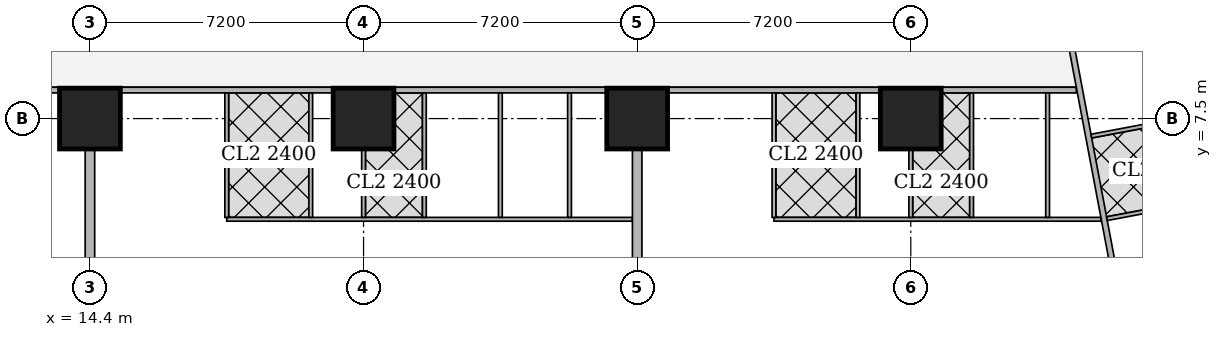
"""IFC4 building model, lengths in metres.
Left out: names, types, materials, properties, quantities, classifications, styles, units other than length and angle.
Written with IfcOpenShell. Run it as: python <this file> out.ifc"""

import sys

from ifc_helpers import new_model, si_unit, direction, frame, frame_2d, origin, origin_2d, place, context, subcontext, project, spatial, rectangle, extrude, element, fill, save


model = new_model("IFC4")
c1 = context("Model", 3, precision=1e-05, world=origin(), true_north=direction((0.0, 1.0)))
c2 = subcontext(c1, "Body", "Model", "MODEL_VIEW")
j1 = project(units=[si_unit("LENGTHUNIT", "METRE"), si_unit("PLANEANGLEUNIT", "RADIAN")], contexts=[c1])
p1 = place(None, origin())
s1 = spatial("IfcSite", under=j1, at=p1, CompositionType="ELEMENT")
p2 = place(p1, origin())
s2 = spatial("IfcBuilding", under=s1, at=p2, CompositionType="ELEMENT")
p3 = place(p2, frame((0.0, 0.0, 81.65)))
s3 = spatial("IfcBuildingStorey", under=s2, at=p3, CompositionType="ELEMENT", Elevation=81.65)
for number, where, z_axis, x_axis in (
    (1, (14.4, 7.5, 0.0), (0.0, 0.0, 1.0), (1.0, 0.0, 0.0)),
    (2, (21.6, 7.5, 0.0), (0.0, 0.0, 1.0), (1.0, 0.0, 0.0)),
    (3, (28.8, 7.5, 0.0), (0.0, 0.0, 1.0), (1.0, 0.0, 0.0)),
    (4, (36.0, 7.5, 0.0), (0.0, 0.0, 1.0), (1.0, 0.0, 0.0)),
):
    element("IfcColumn", number, at=place(p3, frame(where, z_axis=z_axis, x_axis=x_axis)), inside=s3, PredefinedType="COLUMN", context=c2, shape_type="SweptSolid", body=[
        extrude(rectangle(XDim=1.6, YDim=1.6, at=origin_2d()), origin(), (0.0, 0.0, 1.0), 3.75),
    ])
p4 = place(p3, frame((40.356, 8.25, 0.0), z_axis=(0.0, 0.0, 1.0), x_axis=(-1.0, 0.0, 0.0)))
e5 = element("IfcWall", 5, at=p4, inside=s3, PredefinedType="SOLIDWALL", context=c2, shape_type="SweptSolid", body=[
    extrude(rectangle(XDim=3.555, YDim=0.15, at=frame_2d((1.777, 0.0))), origin(), (0.0, 0.0, 1.0), 3.5),
])
p5 = place(p3, frame((35.199, 8.25, 0.0), z_axis=(0.0, 0.0, 1.0), x_axis=(-1.0, 0.0, 0.0)))
e6 = element("IfcWall", 6, at=p5, inside=s3, PredefinedType="SOLIDWALL", context=c2, shape_type="SweptSolid", body=[
    extrude(rectangle(XDim=5.598, YDim=0.15, at=frame_2d((2.799, 0.0))), origin(), (0.0, 0.0, 1.0), 3.5),
])
p6 = place(p5, frame((3.899, 0.0, 0.0)))
e7 = element("IfcOpeningElement", 7, at=p6, cuts=e6, PredefinedType="OPENING", context=c2, shape_type="SweptSolid", body=[
    extrude(rectangle(XDim=1.0, YDim=2.1, at=frame_2d((0.5, 1.05))), frame((0.0, 0.085, 0.0), z_axis=(0.0, -1.0, 0.0), x_axis=(1.0, 0.0, 0.0)), (0.0, 0.0, 1.0), 0.17),
])
p7 = place(p3, frame((27.999, 8.25, 0.0), z_axis=(0.0, 0.0, 1.0), x_axis=(-1.0, 0.0, 0.0)))
e8 = element("IfcWall", 8, at=p7, inside=s3, PredefinedType="SOLIDWALL", context=c2, shape_type="SweptSolid", body=[
    extrude(rectangle(XDim=5.598, YDim=0.15, at=frame_2d((2.799, 0.0))), origin(), (0.0, 0.0, 1.0), 3.5),
])
p8 = place(p3, frame((20.799, 8.25, 0.0), z_axis=(0.0, 0.0, 1.0), x_axis=(-1.0, 0.0, 0.0)))
e9 = element("IfcWall", 9, at=p8, inside=s3, PredefinedType="SOLIDWALL", context=c2, shape_type="SweptSolid", body=[
    extrude(rectangle(XDim=5.598, YDim=0.15, at=frame_2d((2.799, 0.0))), origin(), (0.0, 0.0, 1.0), 3.5),
])
p9 = place(p8, frame((3.899, 0.0, 0.0)))
e10 = element("IfcOpeningElement", 10, at=p9, cuts=e9, PredefinedType="OPENING", context=c2, shape_type="SweptSolid", body=[
    extrude(rectangle(XDim=1.0, YDim=2.1, at=frame_2d((0.5, 1.05))), frame((0.0, 0.085, 0.0), z_axis=(0.0, -1.0, 0.0), x_axis=(1.0, 0.0, 0.0)), (0.0, 0.0, 1.0), 0.17),
])
p10 = place(p3, frame((13.599, 8.25, 0.0), z_axis=(0.0, 0.0, 1.0), x_axis=(-1.0, 0.0, 0.0)))
e11 = element("IfcWall", 11, at=p10, inside=s3, PredefinedType="SOLIDWALL", context=c2, shape_type="SweptSolid", body=[
    extrude(rectangle(XDim=5.499, YDim=0.15, at=frame_2d((2.75, 0.0))), origin(), (0.0, 0.0, 1.0), 3.5),
])
p11 = place(p10, frame((0.76, 0.0, 0.0)))
e12 = element("IfcOpeningElement", 12, at=p11, cuts=e11, PredefinedType="OPENING", context=c2, shape_type="SweptSolid", body=[
    extrude(rectangle(XDim=1.0, YDim=2.1, at=frame_2d((0.5, 1.05))), frame((0.0, 0.085, 0.0), z_axis=(0.0, -1.0, 0.0), x_axis=(1.0, 0.0, 0.0)), (0.0, 0.0, 1.0), 0.17),
])
p12 = place(p3, frame((33.382, 45.65, 0.0), z_axis=(0.0, 0.0, 1.0), x_axis=(0.185593544777, -0.982626600565, 0.0)))
e13 = element("IfcWall", 13, at=p12, inside=s3, PredefinedType="SOLIDWALL", context=c2, shape_type="SweptSolid", body=[
    extrude(rectangle(XDim=47.118, YDim=0.15, at=frame_2d((23.559, 0.0))), origin(), (0.0, 0.0, 1.0), 2.2),
])
p13 = place(p12, frame((19.054, 0.0, 0.0)))
e14 = element("IfcOpeningElement", 14, at=p13, cuts=e13, PredefinedType="OPENING", context=c2, shape_type="SweptSolid", body=[
    extrude(rectangle(XDim=1.0, YDim=2.1, at=frame_2d((0.5, 1.05))), frame((0.0, 0.085, 0.0), z_axis=(0.0, -1.0, 0.0), x_axis=(1.0, 0.0, 0.0)), (0.0, 0.0, 1.0), 0.17),
])
p14 = place(p12, frame((22.87, 0.0, 0.0)))
e15 = element("IfcOpeningElement", 15, at=p14, cuts=e13, PredefinedType="OPENING", context=c2, shape_type="SweptSolid", body=[
    extrude(rectangle(XDim=1.0, YDim=2.1, at=frame_2d((0.5, 1.05))), frame((0.0, 0.085, 0.0), z_axis=(0.0, -1.0, 0.0), x_axis=(1.0, 0.0, 0.0)), (0.0, 0.0, 1.0), 0.17),
])
p15 = place(p12, frame((33.833, 0.0, 0.0)))
e16 = element("IfcOpeningElement", 16, at=p15, cuts=e13, PredefinedType="OPENING", context=c2, shape_type="SweptSolid", body=[
    extrude(rectangle(XDim=1.0, YDim=2.1, at=frame_2d((0.5, 1.05))), frame((0.0, 0.085, 0.0), z_axis=(0.0, -1.0, 0.0), x_axis=(1.0, 0.0, 0.0)), (0.0, 0.0, 1.0), 0.17),
])
p16 = place(p3, frame((28.675, 4.85, 0.0), z_axis=(0.0, 0.0, 1.0), x_axis=(-1.0, 0.0, 0.0)))
e17 = element("IfcWall", 17, at=p16, inside=s3, PredefinedType="PARTITIONING", context=c2, shape_type="SweptSolid", body=[
    extrude(rectangle(XDim=10.675, YDim=0.1, at=frame_2d((5.337, 0.0))), origin(), (0.0, 0.0, 1.0), 3.5),
])
p17 = place(p16, frame((9.12, 0.0, 0.0)))
e18 = element("IfcOpeningElement", 18, at=p17, cuts=e17, PredefinedType="OPENING", context=c2, shape_type="SweptSolid", body=[
    extrude(rectangle(XDim=0.9, YDim=2.1, at=frame_2d((0.45, 1.05))), frame((0.0, 0.06, 0.0), z_axis=(0.0, -1.0, 0.0), x_axis=(1.0, 0.0, 0.0)), (0.0, 0.0, 1.0), 0.12),
])
p18 = place(p16, frame((5.825, 0.0, 0.0)))
e19 = element("IfcOpeningElement", 19, at=p18, cuts=e17, PredefinedType="OPENING", context=c2, shape_type="SweptSolid", body=[
    extrude(rectangle(XDim=0.9, YDim=2.1, at=frame_2d((0.45, 1.05))), frame((0.0, 0.06, 0.0), z_axis=(0.0, -1.0, 0.0), x_axis=(1.0, 0.0, 0.0)), (0.0, 0.0, 1.0), 0.12),
])
p19 = place(p16, frame((2.115, 0.0, 0.0)))
e20 = element("IfcOpeningElement", 20, at=p19, cuts=e17, PredefinedType="OPENING", context=c2, shape_type="SweptSolid", body=[
    extrude(rectangle(XDim=0.9, YDim=2.1, at=frame_2d((0.45, 1.05))), frame((0.0, 0.06, 0.0), z_axis=(0.0, -1.0, 0.0), x_axis=(1.0, 0.0, 0.0)), (0.0, 0.0, 1.0), 0.12),
])
p20 = place(p16, frame((7.32, 0.0, 0.0)))
e21 = element("IfcOpeningElement", 21, at=p20, cuts=e17, PredefinedType="OPENING", context=c2, shape_type="SweptSolid", body=[
    extrude(rectangle(XDim=0.9, YDim=2.1, at=frame_2d((0.45, 1.05))), frame((0.0, 0.06, 0.0), z_axis=(0.0, -1.0, 0.0), x_axis=(1.0, 0.0, 0.0)), (0.0, 0.0, 1.0), 0.12),
])
p21 = place(p16, frame((4.025, 0.0, 0.0)))
e22 = element("IfcOpeningElement", 22, at=p21, cuts=e17, PredefinedType="OPENING", context=c2, shape_type="SweptSolid", body=[
    extrude(rectangle(XDim=0.9, YDim=2.1, at=frame_2d((0.45, 1.05))), frame((0.0, 0.06, 0.0), z_axis=(0.0, -1.0, 0.0), x_axis=(1.0, 0.0, 0.0)), (0.0, 0.0, 1.0), 0.12),
])
p22 = place(p16, frame((0.315, 0.0, 0.0)))
e23 = element("IfcOpeningElement", 23, at=p22, cuts=e17, PredefinedType="OPENING", context=c2, shape_type="SweptSolid", body=[
    extrude(rectangle(XDim=0.9, YDim=2.1, at=frame_2d((0.45, 1.05))), frame((0.0, 0.06, 0.0), z_axis=(0.0, -1.0, 0.0), x_axis=(1.0, 0.0, 0.0)), (0.0, 0.0, 1.0), 0.12),
])
p23 = place(p3, frame((18.0, 4.9, 0.0), z_axis=(0.0, 0.0, 1.0), x_axis=(0.0, 1.0, 0.0)))
e24 = element("IfcWall", 24, at=p23, inside=s3, PredefinedType="PARTITIONING", context=c2, shape_type="SweptSolid", body=[
    extrude(rectangle(XDim=3.275, YDim=0.1, at=frame_2d((1.638, 0.0))), origin(), (0.0, 0.0, 1.0), 3.5),
])
p24 = place(p3, frame((21.6, 4.9, 0.0), z_axis=(0.0, 0.0, 1.0), x_axis=(0.0, 1.0, 0.0)))
e25 = element("IfcWall", 25, at=p24, inside=s3, PredefinedType="PARTITIONING", context=c2, shape_type="SweptSolid", body=[
    extrude(rectangle(XDim=1.799, YDim=0.1, at=frame_2d((0.899, 0.0))), origin(), (0.0, 0.0, 1.0), 3.5),
])
for number, where, z_axis, x_axis in (
    (26, (25.2, 4.9, 0.0), (0.0, 0.0, 1.0), (0.0, 1.0, 0.0)),
    (27, (20.21, 4.9, 0.0), (0.0, 0.0, 1.0), (0.0, 1.0, 0.0)),
    (28, (23.2, 4.9, 0.0), (0.0, 0.0, 1.0), (0.0, 1.0, 0.0)),
    (29, (27.02, 4.9, 0.0), (0.0, 0.0, 1.0), (0.0, 1.0, 0.0)),
):
    element("IfcWall", number, at=place(p3, frame(where, z_axis=z_axis, x_axis=x_axis)), inside=s3, PredefinedType="PARTITIONING", context=c2, shape_type="SweptSolid", body=[
        extrude(rectangle(XDim=3.275, YDim=0.1, at=frame_2d((1.638, 0.0))), origin(), (0.0, 0.0, 1.0), 3.5),
    ])
p25 = place(p3, frame((14.4, 3.65, 0.0), z_axis=(0.0, 0.0, 1.0), x_axis=(0.0, 1.0, 0.0)))
e30 = element("IfcWall", 30, at=p25, inside=s3, PredefinedType="SOLIDWALL", context=c2, shape_type="SweptSolid", body=[
    extrude(rectangle(XDim=3.049, YDim=0.25, at=frame_2d((1.524, 0.0))), origin(), (0.0, 0.0, 1.0), 3.5),
])
p26 = place(p3, frame((41.002, 4.85, 0.0), z_axis=(0.0, 0.0, 1.0), x_axis=(-1.0, 0.0, 0.0)))
e31 = element("IfcWall", 31, at=p26, inside=s3, PredefinedType="PARTITIONING", context=c2, shape_type="SweptSolid", body=[
    extrude(rectangle(XDim=8.602, YDim=0.1, at=frame_2d((4.301, 0.0))), origin(), (0.0, 0.0, 1.0), 3.5),
])
p27 = place(p26, frame((7.047, 0.0, 0.0)))
e32 = element("IfcOpeningElement", 32, at=p27, cuts=e31, PredefinedType="OPENING", context=c2, shape_type="SweptSolid", body=[
    extrude(rectangle(XDim=0.9, YDim=2.1, at=frame_2d((0.45, 1.05))), frame((0.0, 0.06, 0.0), z_axis=(0.0, -1.0, 0.0), x_axis=(1.0, 0.0, 0.0)), (0.0, 0.0, 1.0), 0.12),
])
p28 = place(p26, frame((3.752, 0.0, 0.0)))
e33 = element("IfcOpeningElement", 33, at=p28, cuts=e31, PredefinedType="OPENING", context=c2, shape_type="SweptSolid", body=[
    extrude(rectangle(XDim=0.9, YDim=2.1, at=frame_2d((0.45, 1.05))), frame((0.0, 0.06, 0.0), z_axis=(0.0, -1.0, 0.0), x_axis=(1.0, 0.0, 0.0)), (0.0, 0.0, 1.0), 0.12),
])
p29 = place(p26, frame((0.15, 0.0, 0.0)))
e34 = element("IfcOpeningElement", 34, at=p29, cuts=e31, PredefinedType="OPENING", context=c2, shape_type="SweptSolid", body=[
    extrude(rectangle(XDim=0.9, YDim=2.1, at=frame_2d((0.45, 1.05))), frame((0.0, 0.06, 0.0), z_axis=(0.0, -1.0, 0.0), x_axis=(1.0, 0.0, 0.0)), (0.0, 0.0, 1.0), 0.12),
])
p30 = place(p26, frame((5.247, 0.0, 0.0)))
e35 = element("IfcOpeningElement", 35, at=p30, cuts=e31, PredefinedType="OPENING", context=c2, shape_type="SweptSolid", body=[
    extrude(rectangle(XDim=0.9, YDim=2.1, at=frame_2d((0.45, 1.05))), frame((0.0, 0.06, 0.0), z_axis=(0.0, -1.0, 0.0), x_axis=(1.0, 0.0, 0.0)), (0.0, 0.0, 1.0), 0.12),
])
p31 = place(p26, frame((1.952, 0.0, 0.0)))
e36 = element("IfcOpeningElement", 36, at=p31, cuts=e31, PredefinedType="OPENING", context=c2, shape_type="SweptSolid", body=[
    extrude(rectangle(XDim=0.9, YDim=2.1, at=frame_2d((0.45, 1.05))), frame((0.0, 0.06, 0.0), z_axis=(0.0, -1.0, 0.0), x_axis=(1.0, 0.0, 0.0)), (0.0, 0.0, 1.0), 0.12),
])
p32 = place(p3, frame((32.4, 4.9, 0.0), z_axis=(0.0, 0.0, 1.0), x_axis=(0.0, 1.0, 0.0)))
e37 = element("IfcWall", 37, at=p32, inside=s3, PredefinedType="PARTITIONING", context=c2, shape_type="SweptSolid", body=[
    extrude(rectangle(XDim=3.275, YDim=0.1, at=frame_2d((1.638, 0.0))), origin(), (0.0, 0.0, 1.0), 3.5),
])
p33 = place(p3, frame((36.0, 4.9, 0.0), z_axis=(0.0, 0.0, 1.0), x_axis=(0.0, 1.0, 0.0)))
e38 = element("IfcWall", 38, at=p33, inside=s3, PredefinedType="PARTITIONING", context=c2, shape_type="SweptSolid", body=[
    extrude(rectangle(XDim=1.799, YDim=0.1, at=frame_2d((0.899, 0.0))), origin(), (0.0, 0.0, 1.0), 3.5),
])
for number, where, z_axis, x_axis in (
    (39, (39.6, 4.9, 0.0), (0.0, 0.0, 1.0), (0.0, 1.0, 0.0)),
    (40, (34.61, 4.9, 0.0), (0.0, 0.0, 1.0), (0.0, 1.0, 0.0)),
    (41, (37.6, 4.9, 0.0), (0.0, 0.0, 1.0), (0.0, 1.0, 0.0)),
):
    element("IfcWall", number, at=place(p3, frame(where, z_axis=z_axis, x_axis=x_axis)), inside=s3, PredefinedType="PARTITIONING", context=c2, shape_type="SweptSolid", body=[
        extrude(rectangle(XDim=3.275, YDim=0.1, at=frame_2d((1.638, 0.0))), origin(), (0.0, 0.0, 1.0), 3.5),
    ])
p34 = place(p3, frame((28.8, 3.65, 0.0), z_axis=(0.0, 0.0, 1.0), x_axis=(0.0, 1.0, 0.0)))
e42 = element("IfcWall", 42, at=p34, inside=s3, PredefinedType="SOLIDWALL", context=c2, shape_type="SweptSolid", body=[
    extrude(rectangle(XDim=3.049, YDim=0.25, at=frame_2d((1.524, 0.0))), origin(), (0.0, 0.0, 1.0), 3.5),
])
p35 = place(p3, frame((42.39, 7.348, 0.0), z_axis=(0.0, 0.0, 1.0), x_axis=(-0.9825976927, -0.185746532405, 0.0)))
e43 = element("IfcWall", 43, at=p35, inside=s3, PredefinedType="PARTITIONING", context=c2, shape_type="SweptSolid", body=[
    extrude(rectangle(XDim=1.668, YDim=0.1, at=frame_2d((0.834, 0.0))), origin(), (0.0, 0.0, 1.0), 3.5),
])
p36 = place(p3, frame((44.379, 5.474, 0.0), z_axis=(0.0, 0.0, 1.0), x_axis=(-0.982607026909, -0.185697147715, 0.0)))
e44 = element("IfcWall", 44, at=p36, inside=s3, PredefinedType="PARTITIONING", context=c2, shape_type="SweptSolid", body=[
    extrude(rectangle(XDim=3.275, YDim=0.1, at=frame_2d((1.637, 0.0))), origin(), (0.0, 0.0, 1.0), 3.5),
])
p37 = place(p17, origin())
e45 = element("IfcDoor", 45, at=p37, inside=s3, OperationType="SINGLE_SWING_LEFT", PredefinedType="DOOR", context=c2, shape_type="SweptSolid", body=[
    extrude(rectangle(XDim=0.9, YDim=2.1, at=frame_2d((0.45, 1.05))), frame((0.0, 0.025, 0.0), z_axis=(0.0, -1.0, 0.0), x_axis=(1.0, 0.0, 0.0)), (0.0, 0.0, 1.0), 0.05),
])
fill(e18, e45)
p38 = place(p18, origin())
e46 = element("IfcDoor", 46, at=p38, inside=s3, OperationType="SINGLE_SWING_LEFT", PredefinedType="DOOR", context=c2, shape_type="SweptSolid", body=[
    extrude(rectangle(XDim=0.9, YDim=2.1, at=frame_2d((0.45, 1.05))), frame((0.0, 0.025, 0.0), z_axis=(0.0, -1.0, 0.0), x_axis=(1.0, 0.0, 0.0)), (0.0, 0.0, 1.0), 0.05),
])
fill(e19, e46)
p39 = place(p19, origin())
e47 = element("IfcDoor", 47, at=p39, inside=s3, OperationType="SINGLE_SWING_LEFT", PredefinedType="DOOR", context=c2, shape_type="SweptSolid", body=[
    extrude(rectangle(XDim=0.9, YDim=2.1, at=frame_2d((0.45, 1.05))), frame((0.0, 0.025, 0.0), z_axis=(0.0, -1.0, 0.0), x_axis=(1.0, 0.0, 0.0)), (0.0, 0.0, 1.0), 0.05),
])
fill(e20, e47)
p40 = place(p20, origin())
e48 = element("IfcDoor", 48, at=p40, inside=s3, OperationType="SINGLE_SWING_RIGHT", PredefinedType="DOOR", context=c2, shape_type="SweptSolid", body=[
    extrude(rectangle(XDim=0.9, YDim=2.1, at=frame_2d((0.45, 1.05))), frame((0.0, 0.025, 0.0), z_axis=(0.0, -1.0, 0.0), x_axis=(1.0, 0.0, 0.0)), (0.0, 0.0, 1.0), 0.05),
])
fill(e21, e48)
p41 = place(p21, origin())
e49 = element("IfcDoor", 49, at=p41, inside=s3, OperationType="SINGLE_SWING_RIGHT", PredefinedType="DOOR", context=c2, shape_type="SweptSolid", body=[
    extrude(rectangle(XDim=0.9, YDim=2.1, at=frame_2d((0.45, 1.05))), frame((0.0, 0.025, 0.0), z_axis=(0.0, -1.0, 0.0), x_axis=(1.0, 0.0, 0.0)), (0.0, 0.0, 1.0), 0.05),
])
fill(e22, e49)
p42 = place(p22, origin())
e50 = element("IfcDoor", 50, at=p42, inside=s3, OperationType="SINGLE_SWING_RIGHT", PredefinedType="DOOR", context=c2, shape_type="SweptSolid", body=[
    extrude(rectangle(XDim=0.9, YDim=2.1, at=frame_2d((0.45, 1.05))), frame((0.0, 0.025, 0.0), z_axis=(0.0, -1.0, 0.0), x_axis=(1.0, 0.0, 0.0)), (0.0, 0.0, 1.0), 0.05),
])
fill(e23, e50)
p43 = place(p9, origin())
e51 = element("IfcDoor", 51, at=p43, inside=s3, OperationType="SINGLE_SWING_RIGHT", PredefinedType="DOOR", context=c2, shape_type="SweptSolid", body=[
    extrude(rectangle(XDim=1.0, YDim=2.1, at=frame_2d((0.5, 1.05))), frame((0.0, 0.025, 0.0), z_axis=(0.0, -1.0, 0.0), x_axis=(1.0, 0.0, 0.0)), (0.0, 0.0, 1.0), 0.05),
])
fill(e10, e51)
p44 = place(p27, origin())
e52 = element("IfcDoor", 52, at=p44, inside=s3, OperationType="SINGLE_SWING_LEFT", PredefinedType="DOOR", context=c2, shape_type="SweptSolid", body=[
    extrude(rectangle(XDim=0.9, YDim=2.1, at=frame_2d((0.45, 1.05))), frame((0.0, 0.025, 0.0), z_axis=(0.0, -1.0, 0.0), x_axis=(1.0, 0.0, 0.0)), (0.0, 0.0, 1.0), 0.05),
])
fill(e32, e52)
p45 = place(p28, origin())
e53 = element("IfcDoor", 53, at=p45, inside=s3, OperationType="SINGLE_SWING_LEFT", PredefinedType="DOOR", context=c2, shape_type="SweptSolid", body=[
    extrude(rectangle(XDim=0.9, YDim=2.1, at=frame_2d((0.45, 1.05))), frame((0.0, 0.025, 0.0), z_axis=(0.0, -1.0, 0.0), x_axis=(1.0, 0.0, 0.0)), (0.0, 0.0, 1.0), 0.05),
])
fill(e33, e53)
p46 = place(p29, origin())
e54 = element("IfcDoor", 54, at=p46, inside=s3, OperationType="SINGLE_SWING_RIGHT", PredefinedType="DOOR", context=c2, shape_type="SweptSolid", body=[
    extrude(rectangle(XDim=0.9, YDim=2.1, at=frame_2d((0.45, 1.05))), frame((0.0, 0.025, 0.0), z_axis=(0.0, -1.0, 0.0), x_axis=(1.0, 0.0, 0.0)), (0.0, 0.0, 1.0), 0.05),
])
fill(e34, e54)
p47 = place(p30, origin())
e55 = element("IfcDoor", 55, at=p47, inside=s3, OperationType="SINGLE_SWING_RIGHT", PredefinedType="DOOR", context=c2, shape_type="SweptSolid", body=[
    extrude(rectangle(XDim=0.9, YDim=2.1, at=frame_2d((0.45, 1.05))), frame((0.0, 0.025, 0.0), z_axis=(0.0, -1.0, 0.0), x_axis=(1.0, 0.0, 0.0)), (0.0, 0.0, 1.0), 0.05),
])
fill(e35, e55)
p48 = place(p31, origin())
e56 = element("IfcDoor", 56, at=p48, inside=s3, OperationType="SINGLE_SWING_RIGHT", PredefinedType="DOOR", context=c2, shape_type="SweptSolid", body=[
    extrude(rectangle(XDim=0.9, YDim=2.1, at=frame_2d((0.45, 1.05))), frame((0.0, 0.025, 0.0), z_axis=(0.0, -1.0, 0.0), x_axis=(1.0, 0.0, 0.0)), (0.0, 0.0, 1.0), 0.05),
])
fill(e36, e56)
p49 = place(p6, origin())
e57 = element("IfcDoor", 57, at=p49, inside=s3, OperationType="SINGLE_SWING_RIGHT", PredefinedType="DOOR", context=c2, shape_type="SweptSolid", body=[
    extrude(rectangle(XDim=1.0, YDim=2.1, at=frame_2d((0.5, 1.05))), frame((0.0, 0.025, 0.0), z_axis=(0.0, -1.0, 0.0), x_axis=(1.0, 0.0, 0.0)), (0.0, 0.0, 1.0), 0.05),
])
fill(e7, e57)
save(model, sys.argv[1])
